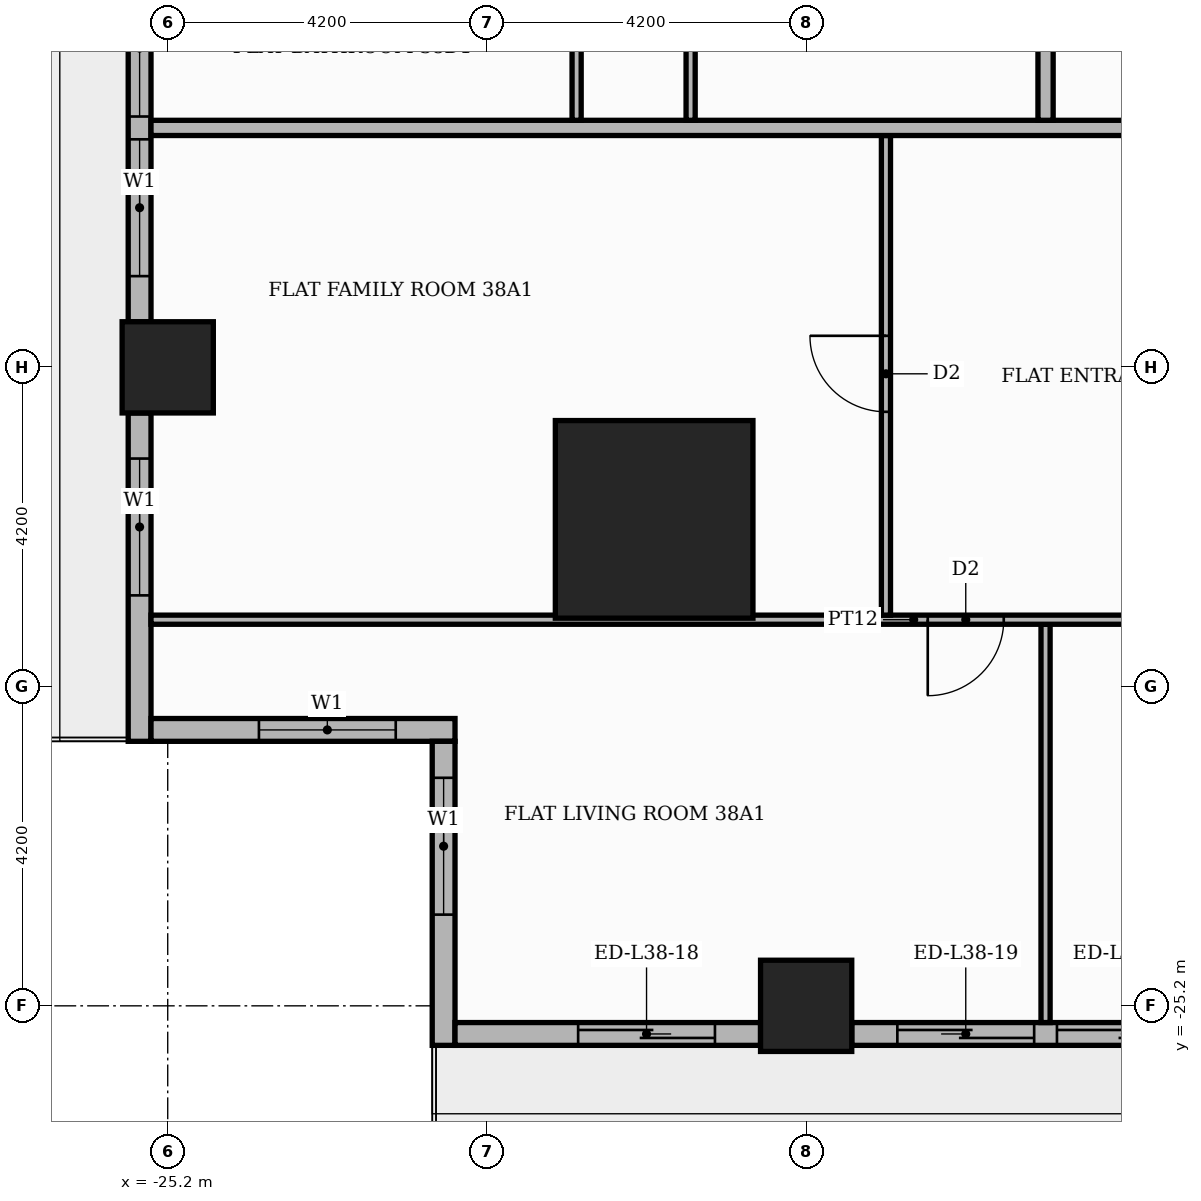
"""IFC4 building model, lengths in metres.
Left out: names, types, materials, properties, quantities, classifications, styles, units other than length and angle.
Written with IfcOpenShell. Run it as: python <this file> out.ifc"""

import sys

from ifc_helpers import new_model, si_unit, direction, frame, frame_2d, origin, origin_2d, place, context, subcontext, project, spatial, rectangle, extrude, element, fill, save


model = new_model("IFC4")
c1 = context("Model", 3, precision=1e-05, world=origin(), true_north=direction((0.0, 1.0)))
c2 = subcontext(c1, "Body", "Model", "MODEL_VIEW")
j1 = project(units=[si_unit("LENGTHUNIT", "METRE"), si_unit("PLANEANGLEUNIT", "RADIAN")], contexts=[c1])
p1 = place(None, origin())
s1 = spatial("IfcSite", under=j1, at=p1, CompositionType="ELEMENT")
p2 = place(p1, origin())
s2 = spatial("IfcBuilding", under=s1, at=p2, CompositionType="ELEMENT")
p3 = place(p2, frame((0.0, 0.0, 161.1)))
s3 = spatial("IfcBuildingStorey", under=s2, at=p3, CompositionType="ELEMENT", Elevation=161.1)
p4 = place(p3, frame((-18.8, -18.8, 0.0), z_axis=(0.0, 0.0, 1.0), x_axis=(1.0, 0.0, 0.0)))
e1 = element("IfcColumn", 1, at=p4, inside=s3, PredefinedType="COLUMN", context=c2, shape_type="SweptSolid", body=[
    extrude(rectangle(XDim=2.6, YDim=2.6, at=origin_2d()), origin(), (0.0, 0.0, 1.0), 3.9),
])
for number, where, z_axis, x_axis in (
    (2, (-16.8, -25.2, 0.0), (0.0, 0.0, 1.0), (1.0, 0.0, 0.0)),
    (3, (-25.2, -16.8, 0.0), (0.0, 0.0, 1.0), (1.0, 0.0, 0.0)),
):
    element("IfcColumn", number, at=place(p3, frame(where, z_axis=z_axis, x_axis=x_axis)), inside=s3, PredefinedType="COLUMN", context=c2, shape_type="SweptSolid", body=[
        extrude(rectangle(XDim=1.2, YDim=1.2, at=origin_2d()), origin(), (0.0, 0.0, 1.0), 3.9),
    ])
p5 = place(p3, frame((-25.57, -9.0, 0.0), z_axis=(0.0, 0.0, 1.0), x_axis=(0.0, -1.0, 0.0)))
e4 = element("IfcWall", 4, at=p5, inside=s3, PredefinedType="STANDARD", context=c2, shape_type="SweptSolid", body=[
    extrude(rectangle(XDim=7.2, YDim=0.3, at=frame_2d((3.6, 0.0))), origin(), (0.0, 0.0, 1.0), 3.48),
])
p6 = place(p5, frame((0.6, 0.0, 0.9)))
e5 = element("IfcOpeningElement", 5, at=p6, cuts=e4, PredefinedType="OPENING", context=c2, shape_type="SweptSolid", body=[
    extrude(rectangle(XDim=1.8, YDim=2.1, at=frame_2d((0.9, 1.05))), frame((0.0, 0.16, 0.0), z_axis=(0.0, -1.0, 0.0), x_axis=(1.0, 0.0, 0.0)), (0.0, 0.0, 1.0), 0.32),
])
p7 = place(p5, frame((2.7, 0.0, 0.9)))
e6 = element("IfcOpeningElement", 6, at=p7, cuts=e4, PredefinedType="OPENING", context=c2, shape_type="SweptSolid", body=[
    extrude(rectangle(XDim=1.8, YDim=2.1, at=frame_2d((0.9, 1.05))), frame((0.0, 0.16, 0.0), z_axis=(0.0, -1.0, 0.0), x_axis=(1.0, 0.0, 0.0)), (0.0, 0.0, 1.0), 0.32),
])
p8 = place(p5, frame((4.8, 0.0, 0.9)))
e7 = element("IfcOpeningElement", 7, at=p8, cuts=e4, PredefinedType="OPENING", context=c2, shape_type="SweptSolid", body=[
    extrude(rectangle(XDim=1.8, YDim=2.1, at=frame_2d((0.9, 1.05))), frame((0.0, 0.16, 0.0), z_axis=(0.0, -1.0, 0.0), x_axis=(1.0, 0.0, 0.0)), (0.0, 0.0, 1.0), 0.32),
])
p9 = place(p3, frame((-25.57, -17.4, 0.0), z_axis=(0.0, 0.0, 1.0), x_axis=(0.0, -1.0, 0.0)))
e8 = element("IfcWall", 8, at=p9, inside=s3, PredefinedType="STANDARD", context=c2, shape_type="SweptSolid", body=[
    extrude(rectangle(XDim=4.32, YDim=0.3, at=frame_2d((2.16, 0.0))), origin(), (0.0, 0.0, 1.0), 3.48),
])
p10 = place(p9, frame((0.6, 0.0, 0.9)))
e9 = element("IfcOpeningElement", 9, at=p10, cuts=e8, PredefinedType="OPENING", context=c2, shape_type="SweptSolid", body=[
    extrude(rectangle(XDim=1.8, YDim=2.1, at=frame_2d((0.9, 1.05))), frame((0.0, 0.16, 0.0), z_axis=(0.0, -1.0, 0.0), x_axis=(1.0, 0.0, 0.0)), (0.0, 0.0, 1.0), 0.32),
])
p11 = place(p3, frame((-25.42, -21.57, 0.0), z_axis=(0.0, 0.0, 1.0), x_axis=(1.0, 0.0, 0.0)))
e10 = element("IfcWall", 10, at=p11, inside=s3, PredefinedType="STANDARD", context=c2, shape_type="SweptSolid", body=[
    extrude(rectangle(XDim=4.0, YDim=0.3, at=frame_2d((2.0, 0.0))), origin(), (0.0, 0.0, 1.0), 3.48),
])
p12 = place(p11, frame((1.42, 0.0, 0.9)))
e11 = element("IfcOpeningElement", 11, at=p12, cuts=e10, PredefinedType="OPENING", context=c2, shape_type="SweptSolid", body=[
    extrude(rectangle(XDim=1.8, YDim=2.1, at=frame_2d((0.9, 1.05))), frame((0.0, 0.16, 0.0), z_axis=(0.0, -1.0, 0.0), x_axis=(1.0, 0.0, 0.0)), (0.0, 0.0, 1.0), 0.32),
])
p13 = place(p3, frame((-21.57, -21.72, 0.0), z_axis=(0.0, 0.0, 1.0), x_axis=(0.0, -1.0, 0.0)))
e12 = element("IfcWall", 12, at=p13, inside=s3, PredefinedType="STANDARD", context=c2, shape_type="SweptSolid", body=[
    extrude(rectangle(XDim=4.0, YDim=0.3, at=frame_2d((2.0, 0.0))), origin(), (0.0, 0.0, 1.0), 3.48),
])
p14 = place(p13, frame((0.48, 0.0, 0.9)))
e13 = element("IfcOpeningElement", 13, at=p14, cuts=e12, PredefinedType="OPENING", context=c2, shape_type="SweptSolid", body=[
    extrude(rectangle(XDim=1.8, YDim=2.1, at=frame_2d((0.9, 1.05))), frame((0.0, 0.16, 0.0), z_axis=(0.0, -1.0, 0.0), x_axis=(1.0, 0.0, 0.0)), (0.0, 0.0, 1.0), 0.32),
])
p15 = place(p3, frame((-21.42, -25.57, 0.0), z_axis=(0.0, 0.0, 1.0), x_axis=(1.0, 0.0, 0.0)))
e14 = element("IfcWall", 14, at=p15, inside=s3, PredefinedType="STANDARD", context=c2, shape_type="SweptSolid", body=[
    extrude(rectangle(XDim=4.02, YDim=0.3, at=frame_2d((2.01, 0.0))), origin(), (0.0, 0.0, 1.0), 3.48),
])
p16 = place(p15, frame((1.62, 0.0, 0.0)))
e15 = element("IfcOpeningElement", 15, at=p16, cuts=e14, PredefinedType="OPENING", context=c2, shape_type="SweptSolid", body=[
    extrude(rectangle(XDim=1.8, YDim=2.4, at=frame_2d((0.9, 1.2))), frame((0.0, 0.16, 0.0), z_axis=(0.0, -1.0, 0.0), x_axis=(1.0, 0.0, 0.0)), (0.0, 0.0, 1.0), 0.32),
])
p17 = place(p3, frame((-16.2, -25.57, 0.0), z_axis=(0.0, 0.0, 1.0), x_axis=(1.0, 0.0, 0.0)))
e16 = element("IfcWall", 16, at=p17, inside=s3, PredefinedType="STANDARD", context=c2, shape_type="SweptSolid", body=[
    extrude(rectangle(XDim=7.2, YDim=0.3, at=frame_2d((3.6, 0.0))), origin(), (0.0, 0.0, 1.0), 3.48),
])
p18 = place(p17, frame((0.6, 0.0, 0.0)))
e17 = element("IfcOpeningElement", 17, at=p18, cuts=e16, PredefinedType="OPENING", context=c2, shape_type="SweptSolid", body=[
    extrude(rectangle(XDim=1.8, YDim=2.4, at=frame_2d((0.9, 1.2))), frame((0.0, 0.16, 0.0), z_axis=(0.0, -1.0, 0.0), x_axis=(1.0, 0.0, 0.0)), (0.0, 0.0, 1.0), 0.32),
])
p19 = place(p17, frame((2.7, 0.0, 0.0)))
e18 = element("IfcOpeningElement", 18, at=p19, cuts=e16, PredefinedType="OPENING", context=c2, shape_type="SweptSolid", body=[
    extrude(rectangle(XDim=1.8, YDim=2.4, at=frame_2d((0.9, 1.2))), frame((0.0, 0.16, 0.0), z_axis=(0.0, -1.0, 0.0), x_axis=(1.0, 0.0, 0.0)), (0.0, 0.0, 1.0), 0.32),
])
p20 = place(p17, frame((4.8, 0.0, 0.9)))
e19 = element("IfcOpeningElement", 19, at=p20, cuts=e16, PredefinedType="OPENING", context=c2, shape_type="SweptSolid", body=[
    extrude(rectangle(XDim=1.8, YDim=2.1, at=frame_2d((0.9, 1.05))), frame((0.0, 0.16, 0.0), z_axis=(0.0, -1.0, 0.0), x_axis=(1.0, 0.0, 0.0)), (0.0, 0.0, 1.0), 0.32),
])
p21 = place(p3, frame((-13.65, -25.42, 0.0), z_axis=(0.0, 0.0, 1.0), x_axis=(0.0, 1.0, 0.0)))
e20 = element("IfcWall", 20, at=p21, inside=s3, PredefinedType="PARTITIONING", context=c2, shape_type="SweptSolid", body=[
    extrude(rectangle(XDim=5.24, YDim=0.12, at=frame_2d((2.62, 0.0))), origin(), (0.0, 0.0, 1.0), 3.48),
])
p22 = place(p3, frame((-25.42, -20.12, 0.0), z_axis=(0.0, 0.0, 1.0), x_axis=(1.0, 0.0, 0.0)))
e21 = element("IfcWall", 21, at=p22, inside=s3, PredefinedType="PARTITIONING", context=c2, shape_type="SweptSolid", body=[
    extrude(rectangle(XDim=20.07, YDim=0.12, at=frame_2d((10.035, 0.0))), origin(), (0.0, 0.0, 1.0), 3.48),
])
p23 = place(p22, frame((10.22, 0.0, 0.0)))
e22 = element("IfcOpeningElement", 22, at=p23, cuts=e21, PredefinedType="OPENING", context=c2, shape_type="SweptSolid", body=[
    extrude(rectangle(XDim=1.0, YDim=2.1, at=frame_2d((0.5, 1.05))), frame((0.0, 0.07, 0.0), z_axis=(0.0, -1.0, 0.0), x_axis=(1.0, 0.0, 0.0)), (0.0, 0.0, 1.0), 0.14),
])
p24 = place(p22, frame((13.42, 0.0, 0.0)))
e23 = element("IfcOpeningElement", 23, at=p24, cuts=e21, PredefinedType="OPENING", context=c2, shape_type="SweptSolid", body=[
    extrude(rectangle(XDim=0.9, YDim=2.1, at=frame_2d((0.45, 1.05))), frame((0.0, 0.07, 0.0), z_axis=(0.0, -1.0, 0.0), x_axis=(1.0, 0.0, 0.0)), (0.0, 0.0, 1.0), 0.14),
])
p25 = place(p3, frame((-15.75, -20.06, 0.0), z_axis=(0.0, 0.0, 1.0), x_axis=(0.0, 1.0, 0.0)))
e24 = element("IfcWall", 24, at=p25, inside=s3, PredefinedType="PARTITIONING", context=c2, shape_type="SweptSolid", body=[
    extrude(rectangle(XDim=6.31, YDim=0.12, at=frame_2d((3.155, 0.0))), origin(), (0.0, 0.0, 1.0), 3.48),
])
p26 = place(p25, frame((2.675, 0.0, 0.0)))
e25 = element("IfcOpeningElement", 25, at=p26, cuts=e24, PredefinedType="OPENING", context=c2, shape_type="SweptSolid", body=[
    extrude(rectangle(XDim=1.0, YDim=2.1, at=frame_2d((0.5, 1.05))), frame((0.0, 0.07, 0.0), z_axis=(0.0, -1.0, 0.0), x_axis=(1.0, 0.0, 0.0)), (0.0, 0.0, 1.0), 0.14),
])
p27 = place(p3, frame((-25.42, -13.65, 0.0), z_axis=(0.0, 0.0, 1.0), x_axis=(1.0, 0.0, 0.0)))
e26 = element("IfcWall", 26, at=p27, inside=s3, PredefinedType="PARTITIONING", context=c2, shape_type="SweptSolid", body=[
    extrude(rectangle(XDim=39.07, YDim=0.2, at=frame_2d((19.535, 0.0))), origin(), (0.0, 0.0, 1.0), 3.48),
])
p28 = place(p27, frame((13.32, 0.0, 0.0)))
e27 = element("IfcOpeningElement", 27, at=p28, cuts=e26, PredefinedType="OPENING", context=c2, shape_type="SweptSolid", body=[
    extrude(rectangle(XDim=1.1, YDim=2.4, at=frame_2d((0.55, 1.2))), frame((0.0, 0.11, 0.0), z_axis=(0.0, -1.0, 0.0), x_axis=(1.0, 0.0, 0.0)), (0.0, 0.0, 1.0), 0.22),
])
p29 = place(p27, frame((21.72, 0.0, 0.0)))
e28 = element("IfcOpeningElement", 28, at=p29, cuts=e26, PredefinedType="OPENING", context=c2, shape_type="SweptSolid", body=[
    extrude(rectangle(XDim=1.1, YDim=2.4, at=frame_2d((0.55, 1.2))), frame((0.0, 0.11, 0.0), z_axis=(0.0, -1.0, 0.0), x_axis=(1.0, 0.0, 0.0)), (0.0, 0.0, 1.0), 0.22),
])
p30 = place(p3, frame((-19.82, -13.55, 0.0), z_axis=(0.0, 0.0, 1.0), x_axis=(0.0, 1.0, 0.0)))
e29 = element("IfcWall", 29, at=p30, inside=s3, PredefinedType="PARTITIONING", context=c2, shape_type="SweptSolid", body=[
    extrude(rectangle(XDim=1.94, YDim=0.12, at=frame_2d((0.97, 0.0))), origin(), (0.0, 0.0, 1.0), 3.48),
])
p31 = place(p3, frame((-18.32, -13.55, 0.0), z_axis=(0.0, 0.0, 1.0), x_axis=(0.0, 1.0, 0.0)))
e30 = element("IfcWall", 30, at=p31, inside=s3, PredefinedType="PARTITIONING", context=c2, shape_type="SweptSolid", body=[
    extrude(rectangle(XDim=4.04, YDim=0.12, at=frame_2d((2.02, 0.0))), origin(), (0.0, 0.0, 1.0), 3.48),
])
p32 = place(p31, frame((1.55, 0.0, 0.0)))
e31 = element("IfcOpeningElement", 31, at=p32, cuts=e30, PredefinedType="OPENING", context=c2, shape_type="SweptSolid", body=[
    extrude(rectangle(XDim=0.9, YDim=2.1, at=frame_2d((0.45, 1.05))), frame((0.0, 0.07, 0.0), z_axis=(0.0, -1.0, 0.0), x_axis=(1.0, 0.0, 0.0)), (0.0, 0.0, 1.0), 0.14),
])
p33 = place(p3, frame((-13.65, -13.55, 0.0), z_axis=(0.0, 0.0, 1.0), x_axis=(0.0, 1.0, 0.0)))
e32 = element("IfcWall", 32, at=p33, inside=s3, PredefinedType="PARTITIONING", context=c2, shape_type="SweptSolid", body=[
    extrude(rectangle(XDim=2.45, YDim=0.2, at=frame_2d((1.225, 0.0))), origin(), (0.0, 0.0, 1.0), 3.48),
])
p34 = place(p7, origin())
e33 = element("IfcWindow", 33, at=p34, inside=s3, PartitioningType="SINGLE_PANEL", PredefinedType="WINDOW", context=c2, shape_type="SweptSolid", body=[
    extrude(rectangle(XDim=1.8, YDim=2.1, at=frame_2d((0.9, 1.05))), frame((0.0, 0.03, 0.0), z_axis=(0.0, -1.0, 0.0), x_axis=(1.0, 0.0, 0.0)), (0.0, 0.0, 1.0), 0.06),
])
fill(e6, e33)
p35 = place(p8, origin())
e34 = element("IfcWindow", 34, at=p35, inside=s3, PartitioningType="SINGLE_PANEL", PredefinedType="WINDOW", context=c2, shape_type="SweptSolid", body=[
    extrude(rectangle(XDim=1.8, YDim=2.1, at=frame_2d((0.9, 1.05))), frame((0.0, 0.03, 0.0), z_axis=(0.0, -1.0, 0.0), x_axis=(1.0, 0.0, 0.0)), (0.0, 0.0, 1.0), 0.06),
])
fill(e7, e34)
p36 = place(p10, origin())
e35 = element("IfcWindow", 35, at=p36, inside=s3, PartitioningType="SINGLE_PANEL", PredefinedType="WINDOW", context=c2, shape_type="SweptSolid", body=[
    extrude(rectangle(XDim=1.8, YDim=2.1, at=frame_2d((0.9, 1.05))), frame((0.0, 0.03, 0.0), z_axis=(0.0, -1.0, 0.0), x_axis=(1.0, 0.0, 0.0)), (0.0, 0.0, 1.0), 0.06),
])
fill(e9, e35)
p37 = place(p12, origin())
e36 = element("IfcWindow", 36, at=p37, inside=s3, PartitioningType="SINGLE_PANEL", PredefinedType="WINDOW", context=c2, shape_type="SweptSolid", body=[
    extrude(rectangle(XDim=1.8, YDim=2.1, at=frame_2d((0.9, 1.05))), frame((0.0, 0.03, 0.0), z_axis=(0.0, -1.0, 0.0), x_axis=(1.0, 0.0, 0.0)), (0.0, 0.0, 1.0), 0.06),
])
fill(e11, e36)
p38 = place(p14, origin())
e37 = element("IfcWindow", 37, at=p38, inside=s3, PartitioningType="SINGLE_PANEL", PredefinedType="WINDOW", context=c2, shape_type="SweptSolid", body=[
    extrude(rectangle(XDim=1.8, YDim=2.1, at=frame_2d((0.9, 1.05))), frame((0.0, 0.03, 0.0), z_axis=(0.0, -1.0, 0.0), x_axis=(1.0, 0.0, 0.0)), (0.0, 0.0, 1.0), 0.06),
])
fill(e13, e37)
p39 = place(p16, origin())
e38 = element("IfcDoor", 38, at=p39, inside=s3, OperationType="SLIDING_TO_RIGHT", PredefinedType="DOOR", context=c2, shape_type="SweptSolid", body=[
    extrude(rectangle(XDim=1.8, YDim=2.4, at=frame_2d((0.9, 1.2))), frame((0.0, 0.025, 0.0), z_axis=(0.0, -1.0, 0.0), x_axis=(1.0, 0.0, 0.0)), (0.0, 0.0, 1.0), 0.05),
])
fill(e15, e38)
p40 = place(p18, origin())
e39 = element("IfcDoor", 39, at=p40, inside=s3, OperationType="SLIDING_TO_LEFT", PredefinedType="DOOR", context=c2, shape_type="SweptSolid", body=[
    extrude(rectangle(XDim=1.8, YDim=2.4, at=frame_2d((0.9, 1.2))), frame((0.0, 0.025, 0.0), z_axis=(0.0, -1.0, 0.0), x_axis=(1.0, 0.0, 0.0)), (0.0, 0.0, 1.0), 0.05),
])
fill(e17, e39)
p41 = place(p19, origin())
e40 = element("IfcDoor", 40, at=p41, inside=s3, OperationType="SLIDING_TO_RIGHT", PredefinedType="DOOR", context=c2, shape_type="SweptSolid", body=[
    extrude(rectangle(XDim=1.8, YDim=2.4, at=frame_2d((0.9, 1.2))), frame((0.0, 0.025, 0.0), z_axis=(0.0, -1.0, 0.0), x_axis=(1.0, 0.0, 0.0)), (0.0, 0.0, 1.0), 0.05),
])
fill(e18, e40)
p42 = place(p26, origin())
e41 = element("IfcDoor", 41, at=p42, inside=s3, OperationType="SINGLE_SWING_RIGHT", PredefinedType="DOOR", context=c2, shape_type="SweptSolid", body=[
    extrude(rectangle(XDim=1.0, YDim=2.1, at=frame_2d((0.5, 1.05))), frame((0.0, 0.025, 0.0), z_axis=(0.0, -1.0, 0.0), x_axis=(1.0, 0.0, 0.0)), (0.0, 0.0, 1.0), 0.05),
])
fill(e25, e41)
p43 = place(p23, frame((1.0, 0.0, 0.0), z_axis=(0.0, 0.0, 1.0), x_axis=(-1.0, 0.0, 0.0)))
e42 = element("IfcDoor", 42, at=p43, inside=s3, OperationType="SINGLE_SWING_LEFT", PredefinedType="DOOR", context=c2, shape_type="SweptSolid", body=[
    extrude(rectangle(XDim=1.0, YDim=2.1, at=frame_2d((0.5, 1.05))), frame((0.0, 0.025, 0.0), z_axis=(0.0, -1.0, 0.0), x_axis=(1.0, 0.0, 0.0)), (0.0, 0.0, 1.0), 0.05),
])
fill(e22, e42)
save(model, sys.argv[1])
